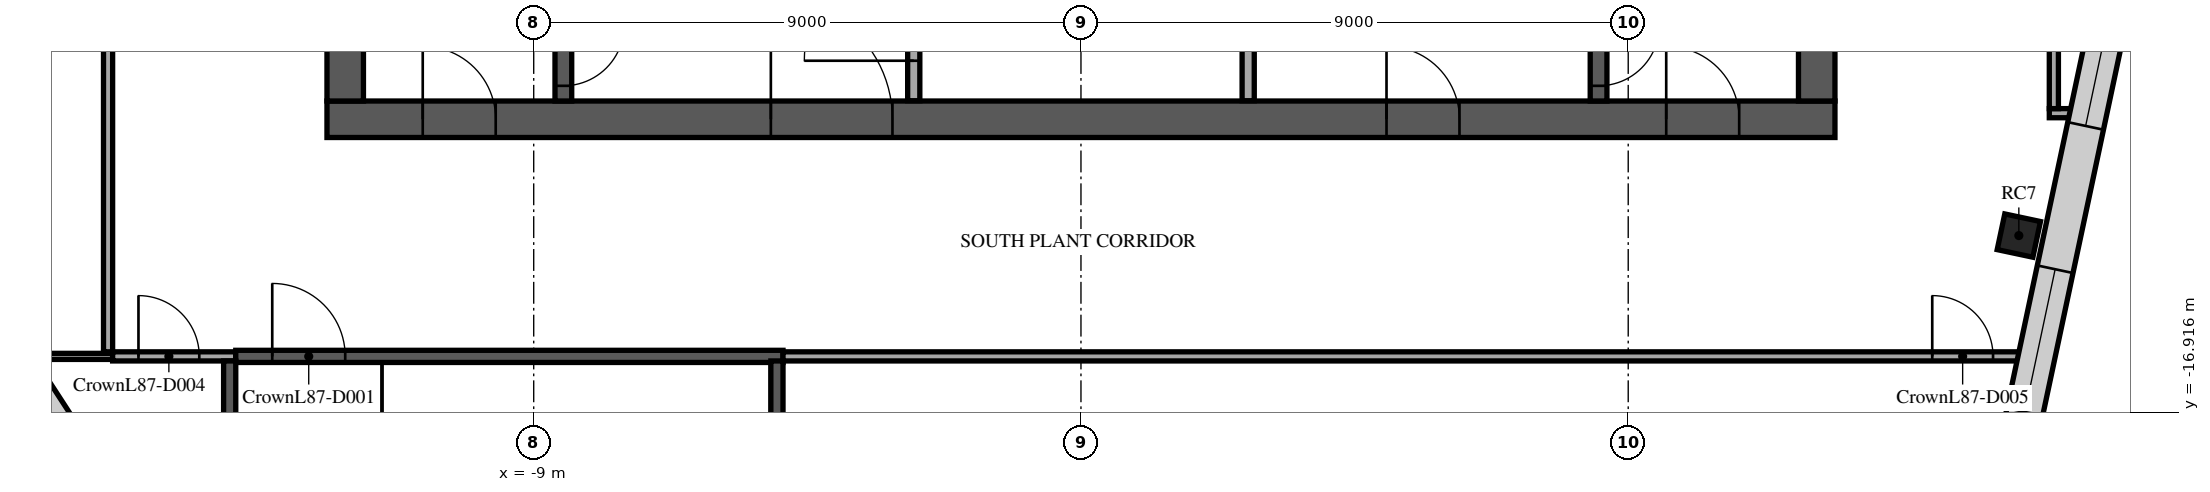
"""IFC4 building model, lengths in metres.
Left out: names, types, materials, properties, quantities, classifications, styles, units other than length and angle.
Written with IfcOpenShell. Run it as: python <this file> out.ifc"""

import sys

from ifc_helpers import new_model, si_unit, direction, frame, frame_2d, origin, origin_2d, place, context, subcontext, project, spatial, rectangle, extrude, element, fill, save


model = new_model("IFC4")
c1 = context("Model", 3, precision=1e-05, world=origin(), true_north=direction((0.0, 1.0)))
c2 = subcontext(c1, "Body", "Model", "MODEL_VIEW")
j1 = project(units=[si_unit("LENGTHUNIT", "METRE"), si_unit("PLANEANGLEUNIT", "RADIAN")], contexts=[c1])
p1 = place(None, origin())
s1 = spatial("IfcSite", under=j1, at=p1, CompositionType="ELEMENT")
p2 = place(p1, origin())
s2 = spatial("IfcBuilding", under=s1, at=p2, CompositionType="ELEMENT")
p3 = place(p2, frame((0.0, 0.0, 373.1)))
s3 = spatial("IfcBuildingStorey", under=s2, at=p3, CompositionType="ELEMENT", Elevation=373.1)
p4 = place(p3, frame((15.424, -14.013, 0.0), z_axis=(0.0, 0.0, 1.0), x_axis=(0.207911690818, 0.978147600734, 0.0)))
e1 = element("IfcColumn", 1, at=p4, inside=s3, PredefinedType="COLUMN", context=c2, shape_type="SweptSolid", body=[
    extrude(rectangle(XDim=0.6, YDim=0.6, at=origin_2d()), origin(), (0.0, 0.0, 1.0), 3.5),
])
p5 = place(p3, frame((-12.4, -12.1, 0.0), z_axis=(0.0, 0.0, 1.0), x_axis=(1.0, 0.0, 0.0)))
e2 = element("IfcWall", 2, at=p5, inside=s3, PredefinedType="SHEAR", context=c2, shape_type="SweptSolid", body=[
    extrude(rectangle(XDim=24.8, YDim=0.6, at=frame_2d((12.4, 0.0))), origin(), (0.0, 0.0, 1.0), 3.2),
])
p6 = place(p5, frame((7.3, 0.0, 0.0)))
e3 = element("IfcOpeningElement", 3, at=p6, cuts=e2, PredefinedType="OPENING", context=c2, shape_type="SweptSolid", body=[
    extrude(rectangle(XDim=2.0, YDim=2.1, at=frame_2d((1.0, 1.05))), frame((0.0, 0.31, 0.0), z_axis=(0.0, -1.0, 0.0), x_axis=(1.0, 0.0, 0.0)), (0.0, 0.0, 1.0), 0.62),
])
p7 = place(p5, frame((17.425, 0.0, 0.0)))
e4 = element("IfcOpeningElement", 4, at=p7, cuts=e2, PredefinedType="OPENING", context=c2, shape_type="SweptSolid", body=[
    extrude(rectangle(XDim=1.2, YDim=2.1, at=frame_2d((0.6, 1.05))), frame((0.0, 0.31, 0.0), z_axis=(0.0, -1.0, 0.0), x_axis=(1.0, 0.0, 0.0)), (0.0, 0.0, 1.0), 0.62),
])
p8 = place(p5, frame((1.575, 0.0, 0.0)))
e5 = element("IfcOpeningElement", 5, at=p8, cuts=e2, PredefinedType="OPENING", context=c2, shape_type="SweptSolid", body=[
    extrude(rectangle(XDim=1.2, YDim=2.1, at=frame_2d((0.6, 1.05))), frame((0.0, 0.31, 0.0), z_axis=(0.0, -1.0, 0.0), x_axis=(1.0, 0.0, 0.0)), (0.0, 0.0, 1.0), 0.62),
])
p9 = place(p5, frame((22.025, 0.0, 0.0)))
e6 = element("IfcOpeningElement", 6, at=p9, cuts=e2, PredefinedType="OPENING", context=c2, shape_type="SweptSolid", body=[
    extrude(rectangle(XDim=1.2, YDim=2.1, at=frame_2d((0.6, 1.05))), frame((0.0, 0.31, 0.0), z_axis=(0.0, -1.0, 0.0), x_axis=(1.0, 0.0, 0.0)), (0.0, 0.0, 1.0), 0.62),
])
p10 = place(p3, frame((12.1, -11.8, 0.0), z_axis=(0.0, 0.0, 1.0), x_axis=(0.0, 1.0, 0.0)))
e7 = element("IfcWall", 7, at=p10, inside=s3, PredefinedType="SHEAR", context=c2, shape_type="SweptSolid", body=[
    extrude(rectangle(XDim=23.6, YDim=0.6, at=frame_2d((11.8, 0.0))), origin(), (0.0, 0.0, 1.0), 3.2),
])
p11 = place(p10, frame((10.6, 0.0, 0.0)))
e8 = element("IfcOpeningElement", 8, at=p11, cuts=e7, PredefinedType="OPENING", context=c2, shape_type="SweptSolid", body=[
    extrude(rectangle(XDim=2.4, YDim=2.4, at=frame_2d((1.2, 1.2))), frame((0.0, 0.31, 0.0), z_axis=(0.0, -1.0, 0.0), x_axis=(1.0, 0.0, 0.0)), (0.0, 0.0, 1.0), 0.62),
])
p12 = place(p3, frame((-12.1, -11.8, 0.0), z_axis=(0.0, 0.0, 1.0), x_axis=(0.0, 1.0, 0.0)))
e9 = element("IfcWall", 9, at=p12, inside=s3, PredefinedType="SHEAR", context=c2, shape_type="SweptSolid", body=[
    extrude(rectangle(XDim=23.6, YDim=0.6, at=frame_2d((11.8, 0.0))), origin(), (0.0, 0.0, 1.0), 3.2),
])
p13 = place(p12, frame((10.6, 0.0, 0.0)))
e10 = element("IfcOpeningElement", 10, at=p13, cuts=e9, PredefinedType="OPENING", context=c2, shape_type="SweptSolid", body=[
    extrude(rectangle(XDim=2.4, YDim=2.4, at=frame_2d((1.2, 1.2))), frame((0.0, 0.31, 0.0), z_axis=(0.0, -1.0, 0.0), x_axis=(1.0, 0.0, 0.0)), (0.0, 0.0, 1.0), 0.62),
])
p14 = place(p3, frame((-8.512, -4.55, 0.0), z_axis=(0.0, 0.0, 1.0), x_axis=(0.0, -1.0, 0.0)))
e11 = element("IfcWall", 11, at=p14, inside=s3, PredefinedType="SOLIDWALL", context=c2, shape_type="SweptSolid", body=[
    extrude(rectangle(XDim=7.25, YDim=0.275, at=frame_2d((3.625, 0.0))), origin(), (0.0, 0.0, 1.0), 3.2),
])
p15 = place(p14, frame((6.0, 0.0, 0.0)))
e12 = element("IfcOpeningElement", 12, at=p15, cuts=e11, PredefinedType="OPENING", context=c2, shape_type="SweptSolid", body=[
    extrude(rectangle(XDim=1.0, YDim=2.1, at=frame_2d((0.5, 1.05))), frame((0.0, 0.147, 0.0), z_axis=(0.0, -1.0, 0.0), x_axis=(1.0, 0.0, 0.0)), (0.0, 0.0, 1.0), 0.295),
])
p16 = place(p3, frame((8.512, -4.55, 0.0), z_axis=(0.0, 0.0, 1.0), x_axis=(0.0, -1.0, 0.0)))
e13 = element("IfcWall", 13, at=p16, inside=s3, PredefinedType="SOLIDWALL", context=c2, shape_type="SweptSolid", body=[
    extrude(rectangle(XDim=7.25, YDim=0.275, at=frame_2d((3.625, 0.0))), origin(), (0.0, 0.0, 1.0), 3.2),
])
p17 = place(p16, frame((6.0, 0.0, 0.0)))
e14 = element("IfcOpeningElement", 14, at=p17, cuts=e13, PredefinedType="OPENING", context=c2, shape_type="SweptSolid", body=[
    extrude(rectangle(XDim=1.0, YDim=2.1, at=frame_2d((0.5, 1.05))), frame((0.0, 0.147, 0.0), z_axis=(0.0, -1.0, 0.0), x_axis=(1.0, 0.0, 0.0)), (0.0, 0.0, 1.0), 0.295),
])
p18 = place(p3, frame((-2.75, -11.795, 0.0), z_axis=(0.0, 0.0, 1.0), x_axis=(0.0, 1.0, 0.0)))
e15 = element("IfcWall", 15, at=p18, inside=s3, PredefinedType="PARTITIONING", context=c2, shape_type="SweptSolid", body=[
    extrude(rectangle(XDim=2.99, YDim=0.2, at=frame_2d((1.495, 0.0))), origin(), (0.0, 0.0, 1.0), 3.2),
])
p19 = place(p18, frame((0.657, 0.0, 0.0)))
e16 = element("IfcOpeningElement", 16, at=p19, cuts=e15, PredefinedType="OPENING", context=c2, shape_type="SweptSolid", body=[
    extrude(rectangle(XDim=1.8, YDim=2.1, at=frame_2d((0.9, 1.05))), frame((0.0, 0.11, 0.0), z_axis=(0.0, -1.0, 0.0), x_axis=(1.0, 0.0, 0.0)), (0.0, 0.0, 1.0), 0.22),
])
p20 = place(p3, frame((2.75, -11.795, 0.0), z_axis=(0.0, 0.0, 1.0), x_axis=(0.0, 1.0, 0.0)))
e17 = element("IfcWall", 17, at=p20, inside=s3, PredefinedType="PARTITIONING", context=c2, shape_type="SweptSolid", body=[
    extrude(rectangle(XDim=2.99, YDim=0.2, at=frame_2d((1.495, 0.0))), origin(), (0.0, 0.0, 1.0), 3.2),
])
p21 = place(p3, frame((-17.475, -16.0, 0.0), z_axis=(0.0, 0.0, 1.0), x_axis=(1.0, 0.0, 0.0)))
e18 = element("IfcWall", 18, at=p21, inside=s3, PredefinedType="PARTITIONING", context=c2, shape_type="SweptSolid", body=[
    extrude(rectangle(XDim=1.55, YDim=0.1, at=frame_2d((0.775, 0.0))), origin(), (0.0, 0.0, 1.0), 3.2),
])
p22 = place(p3, frame((-15.925, -16.0, 0.0), z_axis=(0.0, 0.0, 1.0), x_axis=(1.0, 0.0, 0.0)))
e19 = element("IfcWall", 19, at=p22, inside=s3, PredefinedType="PARTITIONING", context=c2, shape_type="SweptSolid", body=[
    extrude(rectangle(XDim=2.025, YDim=0.15, at=frame_2d((1.013, 0.0))), origin(), (0.0, 0.0, 1.0), 3.2),
])
p23 = place(p22, frame((0.425, 0.0, 0.0)))
e20 = element("IfcOpeningElement", 20, at=p23, cuts=e19, PredefinedType="OPENING", context=c2, shape_type="SweptSolid", body=[
    extrude(rectangle(XDim=1.0, YDim=2.1, at=frame_2d((0.5, 1.05))), frame((0.0, 0.085, 0.0), z_axis=(0.0, -1.0, 0.0), x_axis=(1.0, 0.0, 0.0)), (0.0, 0.0, 1.0), 0.17),
])
p24 = place(p3, frame((-13.9, -16.0, 0.0), z_axis=(0.0, 0.0, 1.0), x_axis=(1.0, 0.0, 0.0)))
e21 = element("IfcWall", 21, at=p24, inside=s3, PredefinedType="PARTITIONING", context=c2, shape_type="SweptSolid", body=[
    extrude(rectangle(XDim=9.0, YDim=0.2, at=frame_2d((4.5, 0.0))), origin(), (0.0, 0.0, 1.0), 3.2),
])
p25 = place(p24, frame((0.6, 0.0, 0.0)))
e22 = element("IfcOpeningElement", 22, at=p25, cuts=e21, PredefinedType="OPENING", context=c2, shape_type="SweptSolid", body=[
    extrude(rectangle(XDim=1.2, YDim=2.1, at=frame_2d((0.6, 1.05))), frame((0.0, 0.11, 0.0), z_axis=(0.0, -1.0, 0.0), x_axis=(1.0, 0.0, 0.0)), (0.0, 0.0, 1.0), 0.22),
])
p26 = place(p3, frame((-4.9, -16.0, 0.0), z_axis=(0.0, 0.0, 1.0), x_axis=(1.0, 0.0, 0.0)))
e23 = element("IfcWall", 23, at=p26, inside=s3, PredefinedType="PARTITIONING", context=c2, shape_type="SweptSolid", body=[
    extrude(rectangle(XDim=20.514, YDim=0.15, at=frame_2d((10.257, 0.0))), origin(), (0.0, 0.0, 1.0), 3.2),
])
p27 = place(p26, frame((18.9, 0.0, 0.0)))
e24 = element("IfcOpeningElement", 24, at=p27, cuts=e23, PredefinedType="OPENING", context=c2, shape_type="SweptSolid", body=[
    extrude(rectangle(XDim=1.0, YDim=2.1, at=frame_2d((0.5, 1.05))), frame((0.0, 0.085, 0.0), z_axis=(0.0, -1.0, 0.0), x_axis=(1.0, 0.0, 0.0)), (0.0, 0.0, 1.0), 0.17),
])
p28 = place(p3, frame((15.925, -12.0, 0.0), z_axis=(0.0, 0.0, 1.0), x_axis=(1.0, 0.0, 0.0)))
e25 = element("IfcWall", 25, at=p28, inside=s3, PredefinedType="PARTITIONING", context=c2, shape_type="SweptSolid", body=[
    extrude(rectangle(XDim=0.54, YDim=0.15, at=frame_2d((0.27, 0.0))), origin(), (0.0, 0.0, 1.0), 3.2),
])
p29 = place(p3, frame((-16.0, -15.925, 0.0), z_axis=(0.0, 0.0, 1.0), x_axis=(0.0, 1.0, 0.0)))
e26 = element("IfcWall", 26, at=p29, inside=s3, PredefinedType="PARTITIONING", context=c2, shape_type="SweptSolid", body=[
    extrude(rectangle(XDim=27.85, YDim=0.15, at=frame_2d((13.925, 0.0))), origin(), (0.0, 0.0, 1.0), 2.63),
])
p30 = place(p29, frame((15.425, 0.0, 0.0)))
e27 = element("IfcOpeningElement", 27, at=p30, cuts=e26, PredefinedType="OPENING", context=c2, shape_type="SweptSolid", body=[
    extrude(rectangle(XDim=1.0, YDim=2.1, at=frame_2d((0.5, 1.05))), frame((0.0, 0.085, 0.0), z_axis=(0.0, -1.0, 0.0), x_axis=(1.0, 0.0, 0.0)), (0.0, 0.0, 1.0), 0.17),
])
p31 = place(p3, frame((-14.0, -19.107, 0.0), z_axis=(0.0, 0.0, 1.0), x_axis=(0.0, 1.0, 0.0)))
e28 = element("IfcWall", 28, at=p31, inside=s3, PredefinedType="PARTITIONING", context=c2, shape_type="SweptSolid", body=[
    extrude(rectangle(XDim=3.032, YDim=0.2, at=frame_2d((1.516, 0.0))), origin(), (0.0, 0.0, 1.0), 2.63),
])
p32 = place(p3, frame((-5.0, -20.4, 0.0), z_axis=(0.0, 0.0, 1.0), x_axis=(0.0, 1.0, 0.0)))
e29 = element("IfcWall", 29, at=p32, inside=s3, PredefinedType="PARTITIONING", context=c2, shape_type="SweptSolid", body=[
    extrude(rectangle(XDim=4.325, YDim=0.2, at=frame_2d((2.163, 0.0))), origin(), (0.0, 0.0, 1.0), 3.2),
])
p33 = place(p3, frame((16.0, -11.925, 0.0), z_axis=(0.0, 0.0, 1.0), x_axis=(0.0, 1.0, 0.0)))
e30 = element("IfcWall", 30, at=p33, inside=s3, PredefinedType="PARTITIONING", context=c2, shape_type="SweptSolid", body=[
    extrude(rectangle(XDim=23.875, YDim=0.15, at=frame_2d((11.938, 0.0))), origin(), (0.0, 0.0, 1.0), 2.63),
])
p34 = place(p33, frame((11.425, 0.0, 0.0)))
e31 = element("IfcOpeningElement", 31, at=p34, cuts=e30, PredefinedType="OPENING", context=c2, shape_type="SweptSolid", body=[
    extrude(rectangle(XDim=1.0, YDim=2.1, at=frame_2d((0.5, 1.05))), frame((0.0, 0.085, 0.0), z_axis=(0.0, -1.0, 0.0), x_axis=(1.0, 0.0, 0.0)), (0.0, 0.0, 1.0), 0.17),
])
p35 = place(p3, frame((15.279, -18.062, 0.0), z_axis=(0.0, 0.0, 1.0), x_axis=(0.207909936091, 0.978147973711, 0.0)))
e32 = element("IfcWall", 32, at=p35, inside=s3, PredefinedType="STANDARD", context=c2, shape_type="SweptSolid", body=[
    extrude(rectangle(XDim=28.982, YDim=0.6, at=frame_2d((14.491, 0.0))), origin(), (0.0, 0.0, 1.0), 3.2),
])
p36 = place(p35, frame((1.174, 0.0, 0.6)))
e33 = element("IfcOpeningElement", 33, at=p36, cuts=e32, PredefinedType="OPENING", context=c2, shape_type="SweptSolid", body=[
    extrude(rectangle(XDim=2.4, YDim=1.85, at=frame_2d((1.2, 0.925))), frame((0.0, 0.31, 0.0), z_axis=(0.0, -1.0, 0.0), x_axis=(1.0, 0.0, 0.0)), (0.0, 0.0, 1.0), 0.62),
])
p37 = place(p35, frame((5.983, 0.0, 0.6)))
e34 = element("IfcOpeningElement", 34, at=p37, cuts=e32, PredefinedType="OPENING", context=c2, shape_type="SweptSolid", body=[
    extrude(rectangle(XDim=2.4, YDim=1.85, at=frame_2d((1.2, 0.925))), frame((0.0, 0.31, 0.0), z_axis=(0.0, -1.0, 0.0), x_axis=(1.0, 0.0, 0.0)), (0.0, 0.0, 1.0), 0.62),
])
p38 = place(p35, frame((10.855, 0.0, 0.6)))
e35 = element("IfcOpeningElement", 35, at=p38, cuts=e32, PredefinedType="OPENING", context=c2, shape_type="SweptSolid", body=[
    extrude(rectangle(XDim=2.4, YDim=1.85, at=frame_2d((1.2, 0.925))), frame((0.0, 0.31, 0.0), z_axis=(0.0, -1.0, 0.0), x_axis=(1.0, 0.0, 0.0)), (0.0, 0.0, 1.0), 0.62),
])
p39 = place(p35, frame((15.727, 0.0, 0.6)))
e36 = element("IfcOpeningElement", 36, at=p39, cuts=e32, PredefinedType="OPENING", context=c2, shape_type="SweptSolid", body=[
    extrude(rectangle(XDim=2.4, YDim=1.85, at=frame_2d((1.2, 0.925))), frame((0.0, 0.31, 0.0), z_axis=(0.0, -1.0, 0.0), x_axis=(1.0, 0.0, 0.0)), (0.0, 0.0, 1.0), 0.62),
])
p40 = place(p35, frame((20.599, 0.0, 0.6)))
e37 = element("IfcOpeningElement", 37, at=p40, cuts=e32, PredefinedType="OPENING", context=c2, shape_type="SweptSolid", body=[
    extrude(rectangle(XDim=2.4, YDim=1.85, at=frame_2d((1.2, 0.925))), frame((0.0, 0.31, 0.0), z_axis=(0.0, -1.0, 0.0), x_axis=(1.0, 0.0, 0.0)), (0.0, 0.0, 1.0), 0.62),
])
p41 = place(p35, frame((25.408, 0.0, 0.6)))
e38 = element("IfcOpeningElement", 38, at=p41, cuts=e32, PredefinedType="OPENING", context=c2, shape_type="SweptSolid", body=[
    extrude(rectangle(XDim=2.4, YDim=1.85, at=frame_2d((1.2, 0.925))), frame((0.0, 0.31, 0.0), z_axis=(0.0, -1.0, 0.0), x_axis=(1.0, 0.0, 0.0)), (0.0, 0.0, 1.0), 0.62),
])
p42 = place(p3, frame((-21.304, -10.286, 0.0), z_axis=(0.0, 0.0, 1.0), x_axis=(0.544646568575, -0.838665675546, 0.0)))
e39 = element("IfcWall", 39, at=p42, inside=s3, PredefinedType="STANDARD", context=c2, shape_type="SweptSolid", body=[
    extrude(rectangle(XDim=10.195, YDim=0.6, at=frame_2d((5.098, 0.0))), origin(), (0.0, 0.0, 1.0), 3.2),
])
p43 = place(p42, frame((1.149, 0.0, 0.6)))
e40 = element("IfcOpeningElement", 40, at=p43, cuts=e39, PredefinedType="OPENING", context=c2, shape_type="SweptSolid", body=[
    extrude(rectangle(XDim=2.8, YDim=1.85, at=frame_2d((1.4, 0.925))), frame((0.0, 0.31, 0.0), z_axis=(0.0, -1.0, 0.0), x_axis=(1.0, 0.0, 0.0)), (0.0, 0.0, 1.0), 0.62),
])
p44 = place(p42, frame((6.246, 0.0, 0.6)))
e41 = element("IfcOpeningElement", 41, at=p44, cuts=e39, PredefinedType="OPENING", context=c2, shape_type="SweptSolid", body=[
    extrude(rectangle(XDim=2.8, YDim=1.85, at=frame_2d((1.4, 0.925))), frame((0.0, 0.31, 0.0), z_axis=(0.0, -1.0, 0.0), x_axis=(1.0, 0.0, 0.0)), (0.0, 0.0, 1.0), 0.62),
])
p45 = place(p6, origin())
e42 = element("IfcDoor", 42, at=p45, inside=s3, OperationType="SINGLE_SWING_LEFT", PredefinedType="DOOR", context=c2, shape_type="SweptSolid", body=[
    extrude(rectangle(XDim=2.0, YDim=2.1, at=frame_2d((1.0, 1.05))), frame((0.0, 0.025, 0.0), z_axis=(0.0, -1.0, 0.0), x_axis=(1.0, 0.0, 0.0)), (0.0, 0.0, 1.0), 0.05),
])
fill(e3, e42)
p46 = place(p7, origin())
e43 = element("IfcDoor", 43, at=p46, inside=s3, OperationType="SINGLE_SWING_LEFT", PredefinedType="DOOR", context=c2, shape_type="SweptSolid", body=[
    extrude(rectangle(XDim=1.2, YDim=2.1, at=frame_2d((0.6, 1.05))), frame((0.0, 0.025, 0.0), z_axis=(0.0, -1.0, 0.0), x_axis=(1.0, 0.0, 0.0)), (0.0, 0.0, 1.0), 0.05),
])
fill(e4, e43)
p47 = place(p8, origin())
e44 = element("IfcDoor", 44, at=p47, inside=s3, OperationType="SINGLE_SWING_LEFT", PredefinedType="DOOR", context=c2, shape_type="SweptSolid", body=[
    extrude(rectangle(XDim=1.2, YDim=2.1, at=frame_2d((0.6, 1.05))), frame((0.0, 0.025, 0.0), z_axis=(0.0, -1.0, 0.0), x_axis=(1.0, 0.0, 0.0)), (0.0, 0.0, 1.0), 0.05),
])
fill(e5, e44)
p48 = place(p9, origin())
e45 = element("IfcDoor", 45, at=p48, inside=s3, OperationType="SINGLE_SWING_LEFT", PredefinedType="DOOR", context=c2, shape_type="SweptSolid", body=[
    extrude(rectangle(XDim=1.2, YDim=2.1, at=frame_2d((0.6, 1.05))), frame((0.0, 0.025, 0.0), z_axis=(0.0, -1.0, 0.0), x_axis=(1.0, 0.0, 0.0)), (0.0, 0.0, 1.0), 0.05),
])
fill(e6, e45)
p49 = place(p15, origin())
e46 = element("IfcDoor", 46, at=p49, inside=s3, OperationType="SINGLE_SWING_LEFT", PredefinedType="DOOR", context=c2, shape_type="SweptSolid", body=[
    extrude(rectangle(XDim=1.0, YDim=2.1, at=frame_2d((0.5, 1.05))), frame((0.0, 0.025, 0.0), z_axis=(0.0, -1.0, 0.0), x_axis=(1.0, 0.0, 0.0)), (0.0, 0.0, 1.0), 0.05),
])
fill(e12, e46)
p50 = place(p17, origin())
e47 = element("IfcDoor", 47, at=p50, inside=s3, OperationType="SINGLE_SWING_LEFT", PredefinedType="DOOR", context=c2, shape_type="SweptSolid", body=[
    extrude(rectangle(XDim=1.0, YDim=2.1, at=frame_2d((0.5, 1.05))), frame((0.0, 0.025, 0.0), z_axis=(0.0, -1.0, 0.0), x_axis=(1.0, 0.0, 0.0)), (0.0, 0.0, 1.0), 0.05),
])
fill(e14, e47)
p51 = place(p19, origin())
e48 = element("IfcDoor", 48, at=p51, inside=s3, OperationType="SINGLE_SWING_LEFT", PredefinedType="DOOR", context=c2, shape_type="SweptSolid", body=[
    extrude(rectangle(XDim=1.8, YDim=2.1, at=frame_2d((0.9, 1.05))), frame((0.0, 0.025, 0.0), z_axis=(0.0, -1.0, 0.0), x_axis=(1.0, 0.0, 0.0)), (0.0, 0.0, 1.0), 0.05),
])
fill(e16, e48)
p52 = place(p25, frame((1.2, 0.0, 0.0), z_axis=(0.0, 0.0, 1.0), x_axis=(-1.0, 0.0, 0.0)))
e49 = element("IfcDoor", 49, at=p52, inside=s3, OperationType="SINGLE_SWING_LEFT", PredefinedType="DOOR", context=c2, shape_type="SweptSolid", body=[
    extrude(rectangle(XDim=1.2, YDim=2.1, at=frame_2d((0.6, 1.05))), frame((0.0, 0.025, 0.0), z_axis=(0.0, -1.0, 0.0), x_axis=(1.0, 0.0, 0.0)), (0.0, 0.0, 1.0), 0.05),
])
fill(e22, e49)
p53 = place(p23, origin())
e50 = element("IfcDoor", 50, at=p53, inside=s3, OperationType="SINGLE_SWING_RIGHT", PredefinedType="DOOR", context=c2, shape_type="SweptSolid", body=[
    extrude(rectangle(XDim=1.0, YDim=2.1, at=frame_2d((0.5, 1.05))), frame((0.0, 0.025, 0.0), z_axis=(0.0, -1.0, 0.0), x_axis=(1.0, 0.0, 0.0)), (0.0, 0.0, 1.0), 0.05),
])
fill(e20, e50)
p54 = place(p27, origin())
e51 = element("IfcDoor", 51, at=p54, inside=s3, OperationType="SINGLE_SWING_LEFT", PredefinedType="DOOR", context=c2, shape_type="SweptSolid", body=[
    extrude(rectangle(XDim=1.0, YDim=2.1, at=frame_2d((0.5, 1.05))), frame((0.0, 0.025, 0.0), z_axis=(0.0, -1.0, 0.0), x_axis=(1.0, 0.0, 0.0)), (0.0, 0.0, 1.0), 0.05),
])
fill(e24, e51)
p55 = place(p36, origin())
e52 = element("IfcWindow", 52, at=p55, inside=s3, PartitioningType="SINGLE_PANEL", PredefinedType="USERDEFINED", context=c2, shape_type="SweptSolid", body=[
    extrude(rectangle(XDim=2.4, YDim=1.85, at=frame_2d((1.2, 0.925))), frame((0.0, 0.03, 0.0), z_axis=(0.0, -1.0, 0.0), x_axis=(1.0, 0.0, 0.0)), (0.0, 0.0, 1.0), 0.06),
])
fill(e33, e52)
p56 = place(p37, origin())
e53 = element("IfcWindow", 53, at=p56, inside=s3, PartitioningType="SINGLE_PANEL", PredefinedType="USERDEFINED", context=c2, shape_type="SweptSolid", body=[
    extrude(rectangle(XDim=2.4, YDim=1.85, at=frame_2d((1.2, 0.925))), frame((0.0, 0.03, 0.0), z_axis=(0.0, -1.0, 0.0), x_axis=(1.0, 0.0, 0.0)), (0.0, 0.0, 1.0), 0.06),
])
fill(e34, e53)
p57 = place(p44, origin())
e54 = element("IfcWindow", 54, at=p57, inside=s3, PartitioningType="SINGLE_PANEL", PredefinedType="USERDEFINED", context=c2, shape_type="SweptSolid", body=[
    extrude(rectangle(XDim=2.8, YDim=1.85, at=frame_2d((1.4, 0.925))), frame((0.0, 0.03, 0.0), z_axis=(0.0, -1.0, 0.0), x_axis=(1.0, 0.0, 0.0)), (0.0, 0.0, 1.0), 0.06),
])
fill(e41, e54)
save(model, sys.argv[1])
